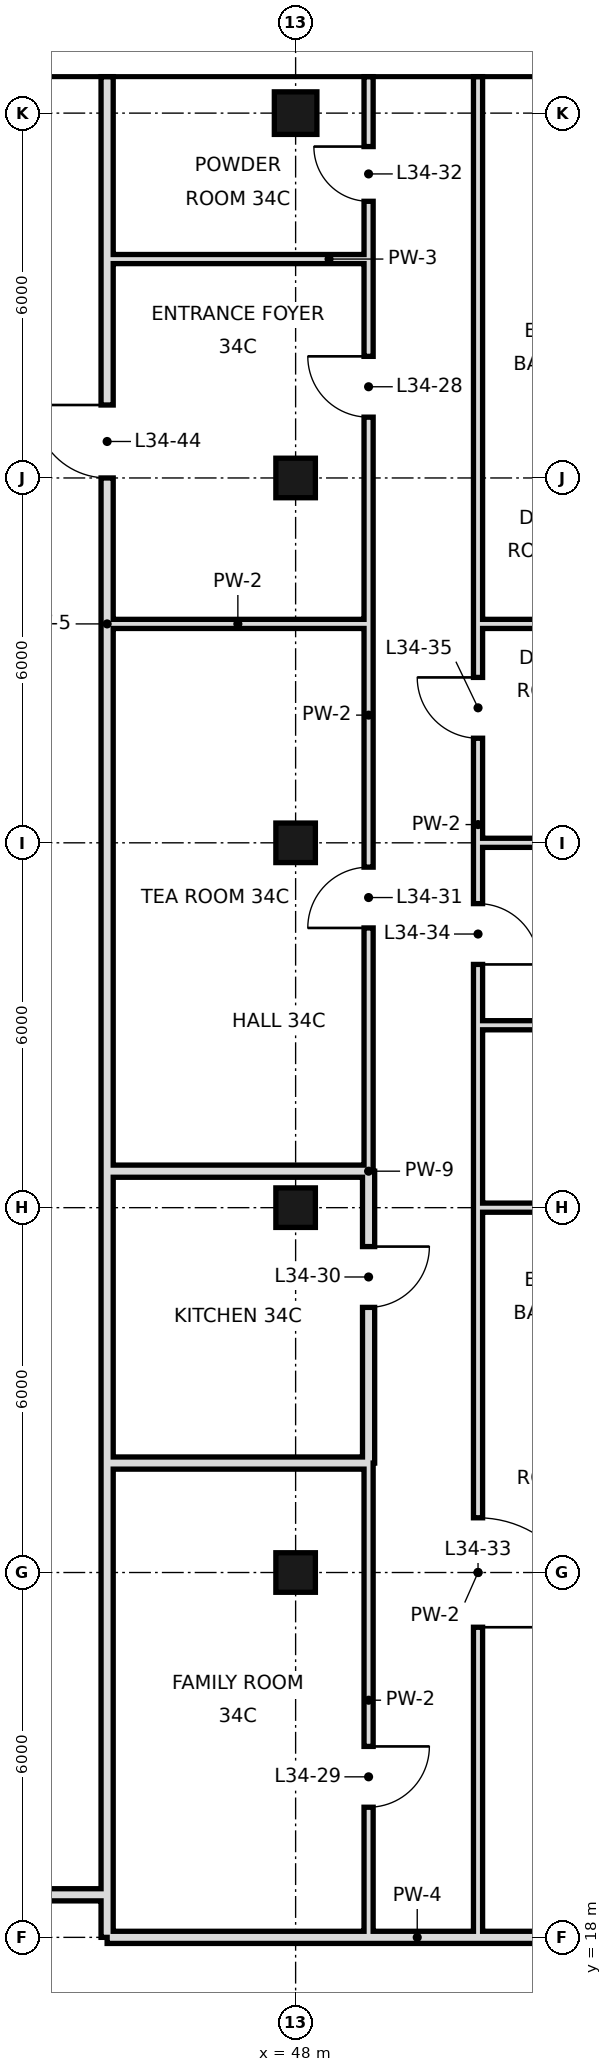
"""IFC4 building model, lengths in metres.
Left out: names, types, materials, properties, quantities, classifications, styles, units other than length and angle.
Written with IfcOpenShell. Run it as: python <this file> out.ifc"""

import sys

from ifc_helpers import new_model, si_unit, direction, frame, frame_2d, origin, origin_2d, place, context, subcontext, project, spatial, rectangle, hollow_rectangle, extrude, element, fill, save


model = new_model("IFC4")
c1 = context("Model", 3, precision=1e-05, world=origin(), true_north=direction((0.0, 1.0)))
c2 = subcontext(c1, "Body", "Model", "MODEL_VIEW")
j1 = project(units=[si_unit("LENGTHUNIT", "METRE"), si_unit("PLANEANGLEUNIT", "RADIAN")], contexts=[c1])
p1 = place(None, origin())
s1 = spatial("IfcSite", under=j1, at=p1, CompositionType="ELEMENT")
p2 = place(p1, origin())
s2 = spatial("IfcBuilding", under=s1, at=p2, CompositionType="ELEMENT")
p3 = place(p2, frame((0.0, 0.0, 151.0)))
s3 = spatial("IfcBuildingStorey", under=s2, at=p3, CompositionType="ELEMENT", Elevation=151.0)
for number, where, z_axis, x_axis in (
    (1, (48.0, 24.0, 0.0), (0.0, 0.0, 1.0), (1.0, 0.0, 0.0)),
    (2, (48.0, 30.0, 0.0), (0.0, 0.0, 1.0), (1.0, 0.0, 0.0)),
    (3, (48.0, 36.0, 0.0), (0.0, 0.0, 1.0), (1.0, 0.0, 0.0)),
    (4, (48.0, 42.0, 0.0), (0.0, 0.0, 1.0), (1.0, 0.0, 0.0)),
):
    element("IfcColumn", number, at=place(p3, frame(where, z_axis=z_axis, x_axis=x_axis)), inside=s3, PredefinedType="COLUMN", context=c2, shape_type="SweptSolid", body=[
        extrude(hollow_rectangle(XDim=0.65, YDim=0.65, WallThickness=0.032, at=origin_2d()), origin(), (0.0, 0.0, 1.0), 3.6),
    ])
p4 = place(p3, frame((48.0, 48.0, 0.0), z_axis=(0.0, 0.0, 1.0), x_axis=(1.0, 0.0, 0.0)))
e5 = element("IfcColumn", 5, at=p4, inside=s3, PredefinedType="COLUMN", context=c2, shape_type="SweptSolid", body=[
    extrude(hollow_rectangle(XDim=0.7, YDim=0.7, WallThickness=0.036, at=origin_2d()), origin(), (0.0, 0.0, 1.0), 3.6),
])
p5 = place(p3, frame((44.9, 18.7, 0.0), z_axis=(0.0, 0.0, 1.0), x_axis=(0.0, 1.0, 0.0)))
e6 = element("IfcWall", 6, at=p5, inside=s3, PredefinedType="SOLIDWALL", context=c2, shape_type="SweptSolid", body=[
    extrude(rectangle(XDim=7.1, YDim=0.2, at=frame_2d((3.55, 0.0))), origin(), (0.0, 0.0, 1.0), 3.42),
])
p6 = place(p3, frame((44.9, 30.6, 0.0), z_axis=(0.0, 0.0, 1.0), x_axis=(0.0, 1.0, 0.0)))
e7 = element("IfcWall", 7, at=p6, inside=s3, PredefinedType="SOLIDWALL", context=c2, shape_type="SweptSolid", body=[
    extrude(rectangle(XDim=18.0, YDim=0.2, at=frame_2d((9.0, 0.0))), origin(), (0.0, 0.0, 1.0), 2.72),
])
p7 = place(p6, frame((11.4, 0.0, 0.0)))
e8 = element("IfcOpeningElement", 8, at=p7, cuts=e7, PredefinedType="OPENING", context=c2, shape_type="SweptSolid", body=[
    extrude(rectangle(XDim=1.2, YDim=2.4, at=frame_2d((0.6, 1.2))), frame((0.0, 0.11, 0.0), z_axis=(0.0, -1.0, 0.0), x_axis=(1.0, 0.0, 0.0)), (0.0, 0.0, 1.0), 0.22),
])
p8 = place(p3, frame((44.9, 25.8, 0.0), z_axis=(0.0, 0.0, 1.0), x_axis=(0.0, 1.0, 0.0)))
e9 = element("IfcWall", 9, at=p8, inside=s3, PredefinedType="SOLIDWALL", context=c2, shape_type="SweptSolid", body=[
    extrude(rectangle(XDim=4.8, YDim=0.2, at=frame_2d((2.4, 0.0))), origin(), (0.0, 0.0, 1.0), 2.97),
])
p9 = place(p3, frame((44.9, 18.0, 0.0), z_axis=(0.0, 0.0, 1.0), x_axis=(0.0, 1.0, 0.0)))
e10 = element("IfcWall", 10, at=p9, inside=s3, PredefinedType="SOLIDWALL", context=c2, shape_type="SweptSolid", body=[
    extrude(rectangle(XDim=0.7, YDim=0.2, at=frame_2d((0.35, 0.0))), origin(), (0.0, 0.0, 1.0), 2.97),
])
p10 = place(p3, frame((49.2, 25.8, 0.0), z_axis=(0.0, 0.0, 1.0), x_axis=(0.0, 1.0, 0.0)))
e11 = element("IfcWall", 11, at=p10, inside=s3, PredefinedType="SOLIDWALL", context=c2, shape_type="SweptSolid", body=[
    extrude(rectangle(XDim=4.8, YDim=0.2, at=frame_2d((2.4, 0.0))), origin(), (0.0, 0.0, 1.0), 2.72),
])
p11 = place(p10, frame((2.56, 0.0, 0.0)))
e12 = element("IfcOpeningElement", 12, at=p11, cuts=e11, PredefinedType="OPENING", context=c2, shape_type="SweptSolid", body=[
    extrude(rectangle(XDim=1.0, YDim=2.4, at=frame_2d((0.5, 1.2))), frame((0.0, 0.11, 0.0), z_axis=(0.0, -1.0, 0.0), x_axis=(1.0, 0.0, 0.0)), (0.0, 0.0, 1.0), 0.22),
])
p12 = place(p3, frame((49.2, 18.0, 0.0), z_axis=(0.0, 0.0, 1.0), x_axis=(0.0, 1.0, 0.0)))
e13 = element("IfcWall", 13, at=p12, inside=s3, PredefinedType="PARTITIONING", context=c2, shape_type="SweptSolid", body=[
    extrude(rectangle(XDim=7.8, YDim=0.15, at=frame_2d((3.9, 0.0))), origin(), (0.0, 0.0, 1.0), 3.42),
])
p13 = place(p12, frame((2.14, 0.0, 0.0)))
e14 = element("IfcOpeningElement", 14, at=p13, cuts=e13, PredefinedType="OPENING", context=c2, shape_type="SweptSolid", body=[
    extrude(rectangle(XDim=1.0, YDim=2.4, at=frame_2d((0.5, 1.2))), frame((0.0, 0.085, 0.0), z_axis=(0.0, -1.0, 0.0), x_axis=(1.0, 0.0, 0.0)), (0.0, 0.0, 1.0), 0.17),
])
p14 = place(p3, frame((49.2, 30.6, 0.0), z_axis=(0.0, 0.0, 1.0), x_axis=(0.0, 1.0, 0.0)))
e15 = element("IfcWall", 15, at=p14, inside=s3, PredefinedType="PARTITIONING", context=c2, shape_type="SweptSolid", body=[
    extrude(rectangle(XDim=15.0, YDim=0.15, at=frame_2d((7.5, 0.0))), origin(), (0.0, 0.0, 1.0), 3.42),
])
p15 = place(p14, frame((12.4, 0.0, 0.0)))
e16 = element("IfcOpeningElement", 16, at=p15, cuts=e15, PredefinedType="OPENING", context=c2, shape_type="SweptSolid", body=[
    extrude(rectangle(XDim=1.0, YDim=2.4, at=frame_2d((0.5, 1.2))), frame((0.0, 0.085, 0.0), z_axis=(0.0, -1.0, 0.0), x_axis=(1.0, 0.0, 0.0)), (0.0, 0.0, 1.0), 0.17),
])
p16 = place(p14, frame((4.0, 0.0, 0.0)))
e17 = element("IfcOpeningElement", 17, at=p16, cuts=e15, PredefinedType="OPENING", context=c2, shape_type="SweptSolid", body=[
    extrude(rectangle(XDim=1.0, YDim=2.4, at=frame_2d((0.5, 1.2))), frame((0.0, 0.085, 0.0), z_axis=(0.0, -1.0, 0.0), x_axis=(1.0, 0.0, 0.0)), (0.0, 0.0, 1.0), 0.17),
])
p17 = place(p3, frame((49.2, 45.6, 0.0), z_axis=(0.0, 0.0, 1.0), x_axis=(0.0, 1.0, 0.0)))
e18 = element("IfcWall", 18, at=p17, inside=s3, PredefinedType="PARTITIONING", context=c2, shape_type="SweptSolid", body=[
    extrude(rectangle(XDim=3.0, YDim=0.15, at=frame_2d((1.5, 0.0))), origin(), (0.0, 0.0, 1.0), 3.42),
])
p18 = place(p17, frame((0.95, 0.0, 0.0)))
e19 = element("IfcOpeningElement", 19, at=p18, cuts=e18, PredefinedType="OPENING", context=c2, shape_type="SweptSolid", body=[
    extrude(rectangle(XDim=0.9, YDim=2.4, at=frame_2d((0.45, 1.2))), frame((0.0, 0.085, 0.0), z_axis=(0.0, -1.0, 0.0), x_axis=(1.0, 0.0, 0.0)), (0.0, 0.0, 1.0), 0.17),
])
p19 = place(p3, frame((51.0, 18.0, 0.0), z_axis=(0.0, 0.0, 1.0), x_axis=(0.0, 1.0, 0.0)))
e20 = element("IfcWall", 20, at=p19, inside=s3, PredefinedType="PARTITIONING", context=c2, shape_type="SweptSolid", body=[
    extrude(rectangle(XDim=12.0, YDim=0.15, at=frame_2d((6.0, 0.0))), origin(), (0.0, 0.0, 1.0), 3.42),
])
p20 = place(p19, frame((5.1, 0.0, 0.0)))
e21 = element("IfcOpeningElement", 21, at=p20, cuts=e20, PredefinedType="OPENING", context=c2, shape_type="SweptSolid", body=[
    extrude(rectangle(XDim=1.8, YDim=2.4, at=frame_2d((0.9, 1.2))), frame((0.0, 0.085, 0.0), z_axis=(0.0, -1.0, 0.0), x_axis=(1.0, 0.0, 0.0)), (0.0, 0.0, 1.0), 0.17),
])
p21 = place(p3, frame((51.0, 33.0, 0.0), z_axis=(0.0, 0.0, 1.0), x_axis=(0.0, 1.0, 0.0)))
e22 = element("IfcWall", 22, at=p21, inside=s3, PredefinedType="PARTITIONING", context=c2, shape_type="SweptSolid", body=[
    extrude(rectangle(XDim=6.6, YDim=0.15, at=frame_2d((3.3, 0.0))), origin(), (0.0, 0.0, 1.0), 3.42),
])
p22 = place(p21, frame((1.0, 0.0, 0.0)))
e23 = element("IfcOpeningElement", 23, at=p22, cuts=e22, PredefinedType="OPENING", context=c2, shape_type="SweptSolid", body=[
    extrude(rectangle(XDim=1.0, YDim=2.4, at=frame_2d((0.5, 1.2))), frame((0.0, 0.085, 0.0), z_axis=(0.0, -1.0, 0.0), x_axis=(1.0, 0.0, 0.0)), (0.0, 0.0, 1.0), 0.17),
])
p23 = place(p21, frame((4.72, 0.0, 0.0)))
e24 = element("IfcOpeningElement", 24, at=p23, cuts=e22, PredefinedType="OPENING", context=c2, shape_type="SweptSolid", body=[
    extrude(rectangle(XDim=1.0, YDim=2.4, at=frame_2d((0.5, 1.2))), frame((0.0, 0.085, 0.0), z_axis=(0.0, -1.0, 0.0), x_axis=(1.0, 0.0, 0.0)), (0.0, 0.0, 1.0), 0.17),
])
p24 = place(p3, frame((51.0, 30.0, 0.0), z_axis=(0.0, 0.0, 1.0), x_axis=(0.0, 1.0, 0.0)))
e25 = element("IfcWall", 25, at=p24, inside=s3, PredefinedType="PARTITIONING", context=c2, shape_type="SweptSolid", body=[
    extrude(rectangle(XDim=3.0, YDim=0.15, at=frame_2d((1.5, 0.0))), origin(), (0.0, 0.0, 1.0), 3.42),
])
p25 = place(p3, frame((51.0, 39.6, 0.0), z_axis=(0.0, 0.0, 1.0), x_axis=(0.0, 1.0, 0.0)))
e26 = element("IfcWall", 26, at=p25, inside=s3, PredefinedType="PARTITIONING", context=c2, shape_type="SweptSolid", body=[
    extrude(rectangle(XDim=9.0, YDim=0.15, at=frame_2d((4.5, 0.0))), origin(), (0.0, 0.0, 1.0), 3.42),
])
p26 = place(p3, frame((44.9, 18.0, 0.0), z_axis=(0.0, 0.0, 1.0), x_axis=(1.0, 0.0, 0.0)))
e27 = element("IfcWall", 27, at=p26, inside=s3, PredefinedType="SOLIDWALL", context=c2, shape_type="SweptSolid", body=[
    extrude(rectangle(XDim=10.9, YDim=0.2, at=frame_2d((5.45, 0.0))), origin(), (0.0, 0.0, 1.0), 2.72),
])
p27 = place(p3, frame((3.1, 18.7, 0.0), z_axis=(0.0, 0.0, 1.0), x_axis=(1.0, 0.0, 0.0)))
e28 = element("IfcWall", 28, at=p27, inside=s3, PredefinedType="SOLIDWALL", context=c2, shape_type="SweptSolid", body=[
    extrude(rectangle(XDim=41.8, YDim=0.2, at=frame_2d((20.9, 0.0))), origin(), (0.0, 0.0, 1.0), 2.72),
])
p28 = place(p27, frame((5.64, 0.0, 0.0)))
e29 = element("IfcOpeningElement", 29, at=p28, cuts=e28, PredefinedType="OPENING", context=c2, shape_type="SweptSolid", body=[
    extrude(rectangle(XDim=1.2, YDim=2.4, at=frame_2d((0.6, 1.2))), frame((0.0, 0.11, 0.0), z_axis=(0.0, -1.0, 0.0), x_axis=(1.0, 0.0, 0.0)), (0.0, 0.0, 1.0), 0.22),
])
p29 = place(p27, frame((24.16, 0.0, 0.0)))
e30 = element("IfcOpeningElement", 30, at=p29, cuts=e28, PredefinedType="OPENING", context=c2, shape_type="SweptSolid", body=[
    extrude(rectangle(XDim=1.2, YDim=2.4, at=frame_2d((0.6, 1.2))), frame((0.0, 0.11, 0.0), z_axis=(0.0, -1.0, 0.0), x_axis=(1.0, 0.0, 0.0)), (0.0, 0.0, 1.0), 0.22),
])
p30 = place(p3, frame((44.9, 25.8, 0.0), z_axis=(0.0, 0.0, 1.0), x_axis=(1.0, 0.0, 0.0)))
e31 = element("IfcWall", 31, at=p30, inside=s3, PredefinedType="SOLIDWALL", context=c2, shape_type="SweptSolid", body=[
    extrude(rectangle(XDim=4.3, YDim=0.2, at=frame_2d((2.15, 0.0))), origin(), (0.0, 0.0, 1.0), 2.97),
])
p31 = place(p3, frame((51.0, 30.0, 0.0), z_axis=(0.0, 0.0, 1.0), x_axis=(1.0, 0.0, 0.0)))
e32 = element("IfcWall", 32, at=p31, inside=s3, PredefinedType="PARTITIONING", context=c2, shape_type="SweptSolid", body=[
    extrude(rectangle(XDim=3.0, YDim=0.15, at=frame_2d((1.5, 0.0))), origin(), (0.0, 0.0, 1.0), 2.72),
])
p32 = place(p3, frame((44.9, 30.6, 0.0), z_axis=(0.0, 0.0, 1.0), x_axis=(1.0, 0.0, 0.0)))
e33 = element("IfcWall", 33, at=p32, inside=s3, PredefinedType="SOLIDWALL", context=c2, shape_type="SweptSolid", body=[
    extrude(rectangle(XDim=4.3, YDim=0.2, at=frame_2d((2.15, 0.0))), origin(), (0.0, 0.0, 1.0), 2.97),
])
p33 = place(p3, frame((51.0, 33.0, 0.0), z_axis=(0.0, 0.0, 1.0), x_axis=(1.0, 0.0, 0.0)))
e34 = element("IfcWall", 34, at=p33, inside=s3, PredefinedType="PARTITIONING", context=c2, shape_type="SweptSolid", body=[
    extrude(rectangle(XDim=3.0, YDim=0.15, at=frame_2d((1.5, 0.0))), origin(), (0.0, 0.0, 1.0), 3.42),
])
p34 = place(p3, frame((51.0, 36.0, 0.0), z_axis=(0.0, 0.0, 1.0), x_axis=(1.0, 0.0, 0.0)))
e35 = element("IfcWall", 35, at=p34, inside=s3, PredefinedType="PARTITIONING", context=c2, shape_type="SweptSolid", body=[
    extrude(rectangle(XDim=9.0, YDim=0.15, at=frame_2d((4.5, 0.0))), origin(), (0.0, 0.0, 1.0), 2.72),
])
p35 = place(p3, frame((44.9, 39.6, 0.0), z_axis=(0.0, 0.0, 1.0), x_axis=(1.0, 0.0, 0.0)))
e36 = element("IfcWall", 36, at=p35, inside=s3, PredefinedType="PARTITIONING", context=c2, shape_type="SweptSolid", body=[
    extrude(rectangle(XDim=4.3, YDim=0.15, at=frame_2d((2.15, 0.0))), origin(), (0.0, 0.0, 1.0), 3.42),
])
p36 = place(p3, frame((51.0, 39.6, 0.0), z_axis=(0.0, 0.0, 1.0), x_axis=(1.0, 0.0, 0.0)))
e37 = element("IfcWall", 37, at=p36, inside=s3, PredefinedType="PARTITIONING", context=c2, shape_type="SweptSolid", body=[
    extrude(rectangle(XDim=3.0, YDim=0.15, at=frame_2d((1.5, 0.0))), origin(), (0.0, 0.0, 1.0), 3.42),
])
p37 = place(p3, frame((44.9, 45.6, 0.0), z_axis=(0.0, 0.0, 1.0), x_axis=(1.0, 0.0, 0.0)))
e38 = element("IfcWall", 38, at=p37, inside=s3, PredefinedType="PARTITIONING", context=c2, shape_type="SweptSolid", body=[
    extrude(rectangle(XDim=4.3, YDim=0.15, at=frame_2d((2.15, 0.0))), origin(), (0.0, 0.0, 1.0), 3.42),
])
p38 = place(p15, frame((1.0, 0.0, 0.0), z_axis=(0.0, 0.0, 1.0), x_axis=(-1.0, 0.0, 0.0)))
e39 = element("IfcDoor", 39, at=p38, inside=s3, OperationType="SINGLE_SWING_LEFT", PredefinedType="DOOR", context=c2, shape_type="SweptSolid", body=[
    extrude(rectangle(XDim=1.0, YDim=2.4, at=frame_2d((0.5, 1.2))), frame((0.0, 0.025, 0.0), z_axis=(0.0, -1.0, 0.0), x_axis=(1.0, 0.0, 0.0)), (0.0, 0.0, 1.0), 0.05),
])
fill(e16, e39)
p39 = place(p13, origin())
e40 = element("IfcDoor", 40, at=p39, inside=s3, OperationType="SINGLE_SWING_RIGHT", PredefinedType="DOOR", context=c2, shape_type="SweptSolid", body=[
    extrude(rectangle(XDim=1.0, YDim=2.4, at=frame_2d((0.5, 1.2))), frame((0.0, 0.025, 0.0), z_axis=(0.0, -1.0, 0.0), x_axis=(1.0, 0.0, 0.0)), (0.0, 0.0, 1.0), 0.05),
])
fill(e14, e40)
p40 = place(p11, origin())
e41 = element("IfcDoor", 41, at=p40, inside=s3, OperationType="SINGLE_SWING_RIGHT", PredefinedType="DOOR", context=c2, shape_type="SweptSolid", body=[
    extrude(rectangle(XDim=1.0, YDim=2.4, at=frame_2d((0.5, 1.2))), frame((0.0, 0.025, 0.0), z_axis=(0.0, -1.0, 0.0), x_axis=(1.0, 0.0, 0.0)), (0.0, 0.0, 1.0), 0.05),
])
fill(e12, e41)
p41 = place(p16, origin())
e42 = element("IfcDoor", 42, at=p41, inside=s3, OperationType="SINGLE_SWING_LEFT", PredefinedType="DOOR", context=c2, shape_type="SweptSolid", body=[
    extrude(rectangle(XDim=1.0, YDim=2.4, at=frame_2d((0.5, 1.2))), frame((0.0, 0.025, 0.0), z_axis=(0.0, -1.0, 0.0), x_axis=(1.0, 0.0, 0.0)), (0.0, 0.0, 1.0), 0.05),
])
fill(e17, e42)
p42 = place(p18, frame((0.9, 0.0, 0.0), z_axis=(0.0, 0.0, 1.0), x_axis=(-1.0, 0.0, 0.0)))
e43 = element("IfcDoor", 43, at=p42, inside=s3, OperationType="SINGLE_SWING_LEFT", PredefinedType="DOOR", context=c2, shape_type="SweptSolid", body=[
    extrude(rectangle(XDim=0.9, YDim=2.4, at=frame_2d((0.45, 1.2))), frame((0.0, 0.025, 0.0), z_axis=(0.0, -1.0, 0.0), x_axis=(1.0, 0.0, 0.0)), (0.0, 0.0, 1.0), 0.05),
])
fill(e19, e43)
p43 = place(p20, frame((1.8, 0.0, 0.0), z_axis=(0.0, 0.0, 1.0), x_axis=(-1.0, 0.0, 0.0)))
e44 = element("IfcDoor", 44, at=p43, inside=s3, OperationType="SINGLE_SWING_RIGHT", PredefinedType="DOOR", context=c2, shape_type="SweptSolid", body=[
    extrude(rectangle(XDim=1.8, YDim=2.4, at=frame_2d((0.9, 1.2))), frame((0.0, 0.025, 0.0), z_axis=(0.0, -1.0, 0.0), x_axis=(1.0, 0.0, 0.0)), (0.0, 0.0, 1.0), 0.05),
])
fill(e21, e44)
p44 = place(p22, frame((1.0, 0.0, 0.0), z_axis=(0.0, 0.0, 1.0), x_axis=(-1.0, 0.0, 0.0)))
e45 = element("IfcDoor", 45, at=p44, inside=s3, OperationType="SINGLE_SWING_RIGHT", PredefinedType="DOOR", context=c2, shape_type="SweptSolid", body=[
    extrude(rectangle(XDim=1.0, YDim=2.4, at=frame_2d((0.5, 1.2))), frame((0.0, 0.025, 0.0), z_axis=(0.0, -1.0, 0.0), x_axis=(1.0, 0.0, 0.0)), (0.0, 0.0, 1.0), 0.05),
])
fill(e23, e45)
p45 = place(p23, frame((1.0, 0.0, 0.0), z_axis=(0.0, 0.0, 1.0), x_axis=(-1.0, 0.0, 0.0)))
e46 = element("IfcDoor", 46, at=p45, inside=s3, OperationType="SINGLE_SWING_LEFT", PredefinedType="DOOR", context=c2, shape_type="SweptSolid", body=[
    extrude(rectangle(XDim=1.0, YDim=2.4, at=frame_2d((0.5, 1.2))), frame((0.0, 0.025, 0.0), z_axis=(0.0, -1.0, 0.0), x_axis=(1.0, 0.0, 0.0)), (0.0, 0.0, 1.0), 0.05),
])
fill(e24, e46)
p46 = place(p7, frame((1.2, 0.0, 0.0), z_axis=(0.0, 0.0, 1.0), x_axis=(-1.0, 0.0, 0.0)))
e47 = element("IfcDoor", 47, at=p46, inside=s3, OperationType="SINGLE_SWING_LEFT", PredefinedType="DOOR", context=c2, shape_type="SweptSolid", body=[
    extrude(rectangle(XDim=1.2, YDim=2.4, at=frame_2d((0.6, 1.2))), frame((0.0, 0.025, 0.0), z_axis=(0.0, -1.0, 0.0), x_axis=(1.0, 0.0, 0.0)), (0.0, 0.0, 1.0), 0.05),
])
fill(e8, e47)
save(model, sys.argv[1])
